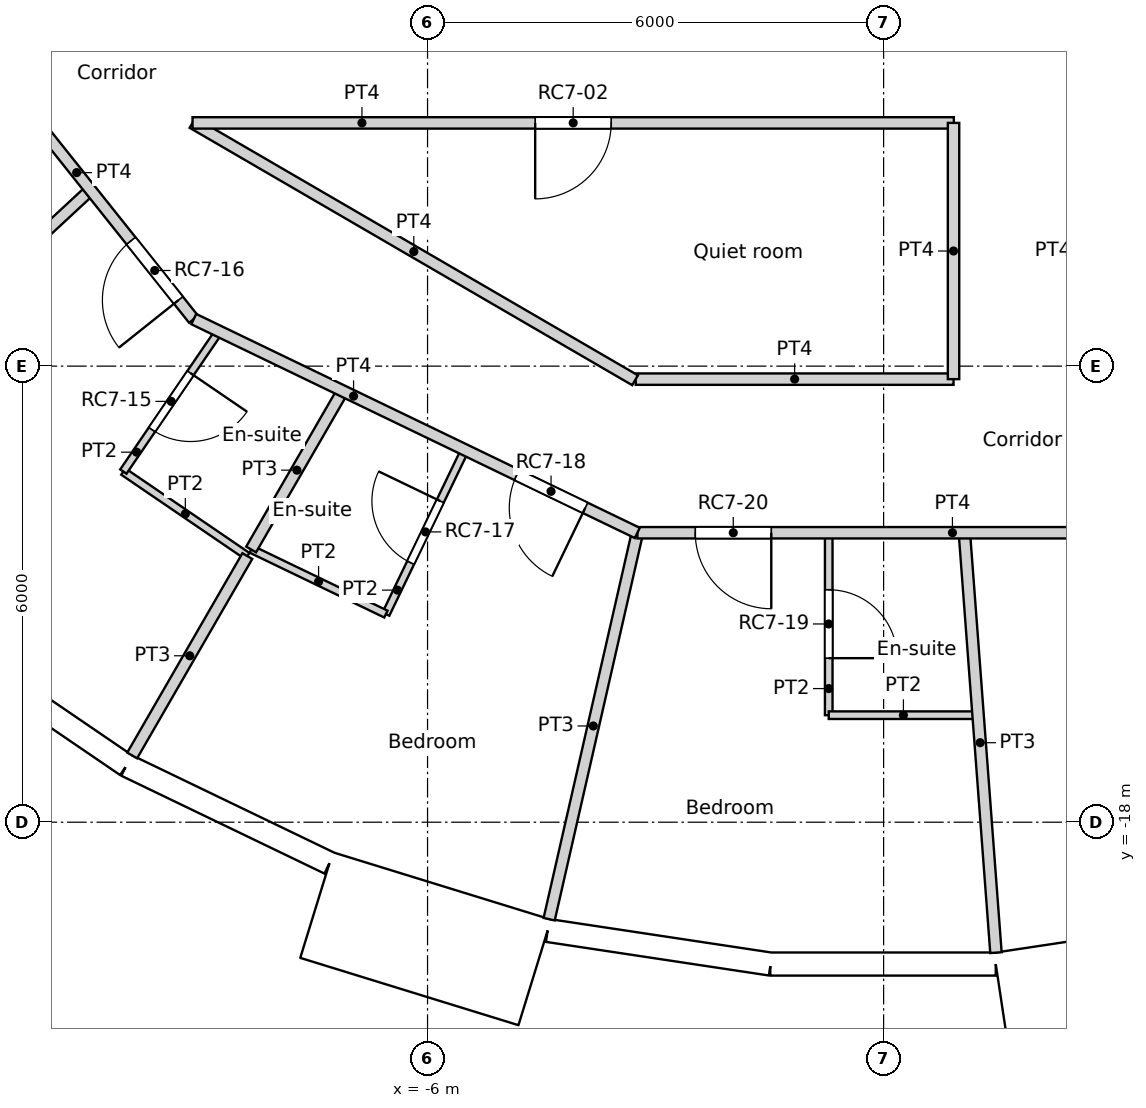
"""IFC4 building model, lengths in metres.
Left out: names, types, materials, properties, quantities, classifications, styles, units other than length and angle.
Written with IfcOpenShell. Run it as: python <this file> out.ifc"""

import sys

from ifc_helpers import new_model, si_unit, direction, frame, frame_2d, origin, origin_2d, place, context, subcontext, project, spatial, rectangle, circle, extrude, element, fill, save


model = new_model("IFC4")
c1 = context("Model", 3, precision=1e-05, world=origin(), true_north=direction((0.0, 1.0)))
c2 = subcontext(c1, "Body", "Model", "MODEL_VIEW")
j1 = project(units=[si_unit("LENGTHUNIT", "METRE"), si_unit("PLANEANGLEUNIT", "RADIAN")], contexts=[c1])
p1 = place(None, origin())
s1 = spatial("IfcSite", under=j1, at=p1, CompositionType="ELEMENT")
p2 = place(p1, origin())
s2 = spatial("IfcBuilding", under=s1, at=p2, CompositionType="ELEMENT")
p3 = place(p2, frame((0.0, 0.0, 294.6)))
s3 = spatial("IfcBuildingStorey", under=s2, at=p3, CompositionType="ELEMENT", Elevation=294.6)
for number, where, z_axis, x_axis in (
    (1, (-9.411, -16.301, 0.0), (0.0, 0.0, 1.0), (1.0, 0.0, 0.0)),
    (2, (-4.188, -18.35, 0.0), (0.0, 0.0, 1.0), (1.0, 0.0, 0.0)),
    (3, (1.406, -18.77, 0.0), (0.0, 0.0, 1.0), (1.0, 0.0, 0.0)),
):
    element("IfcColumn", number, at=place(p3, frame(where, z_axis=z_axis, x_axis=x_axis)), inside=s3, PredefinedType="COLUMN", context=c2, shape_type="SweptSolid", body=[
        extrude(circle(Radius=0.45, at=origin_2d()), origin(), (0.0, 0.0, 1.0), 3.6),
    ])
p4 = place(p3, frame((-12.408, -15.584, 0.0), z_axis=(0.0, 0.0, 1.0), x_axis=(0.826236061068, -0.563324037646, 0.0)))
e4 = element("IfcWall", 4, at=p4, inside=s3, PredefinedType="SOLIDWALL", context=c2, shape_type="SweptSolid", body=[
    extrude(rectangle(XDim=2.962, YDim=0.3, at=frame_2d((1.481, 0.0))), origin(), (0.0, 0.0, 1.0), 3.25),
])
p5 = place(p4, frame((1.481, 0.0, 1.55)))
e5 = element("IfcOpeningElement", 5, at=p5, cuts=e4, PredefinedType="OPENING", context=c2, shape_type="SweptSolid", body=[
    extrude(circle(Radius=0.9, at=origin_2d()), frame((0.0, 0.16, 0.0), z_axis=(0.0, -1.0, 0.0), x_axis=(1.0, 0.0, 0.0)), (0.0, 0.0, 1.0), 0.32),
])
p6 = place(p3, frame((-9.961, -17.253, 0.0), z_axis=(0.0, 0.0, 1.0), x_axis=(0.90095513435, -0.433912255978, 0.0)))
e6 = element("IfcWall", 6, at=p6, inside=s3, PredefinedType="SOLIDWALL", context=c2, shape_type="SweptSolid", body=[
    extrude(rectangle(XDim=2.962, YDim=0.3, at=frame_2d((1.481, 0.0))), origin(), (0.0, 0.0, 1.0), 3.25),
])
p7 = place(p6, frame((1.481, 0.0, 1.55)))
e7 = element("IfcOpeningElement", 7, at=p7, cuts=e6, PredefinedType="OPENING", context=c2, shape_type="SweptSolid", body=[
    extrude(circle(Radius=0.9, at=origin_2d()), frame((0.0, 0.16, 0.0), z_axis=(0.0, -1.0, 0.0), x_axis=(1.0, 0.0, 0.0)), (0.0, 0.0, 1.0), 0.32),
])
p8 = place(p3, frame((-7.458, -19.091, -0.35), z_axis=(0.0, 0.0, 1.0), x_axis=(0.955571139978, -0.294760574774, 0.0)))
e8 = element("IfcWall", 8, at=p8, inside=s3, PredefinedType="ELEMENTEDWALL", context=c2, shape_type="SweptSolid", body=[
    extrude(rectangle(XDim=3.0, YDim=1.45, at=frame_2d((1.5, 0.0))), origin(), (0.0, 0.0, 1.0), 3.6),
])
p9 = place(p8, frame((1.5, 0.0, 1.9)))
e9 = element("IfcOpeningElement", 9, at=p9, cuts=e8, PredefinedType="OPENING", context=c2, shape_type="SweptSolid", body=[
    extrude(circle(Radius=0.9, at=origin_2d()), frame((0.0, 0.735, 0.0), z_axis=(0.0, -1.0, 0.0), x_axis=(1.0, 0.0, 0.0)), (0.0, 0.0, 1.0), 1.47),
])
p10 = place(p3, frame((-4.418, -19.425, 0.0), z_axis=(0.0, 0.0, 1.0), x_axis=(0.988835775663, -0.149009425104, 0.0)))
e10 = element("IfcWall", 10, at=p10, inside=s3, PredefinedType="SOLIDWALL", context=c2, shape_type="SweptSolid", body=[
    extrude(rectangle(XDim=2.962, YDim=0.3, at=frame_2d((1.481, 0.0))), origin(), (0.0, 0.0, 1.0), 3.25),
])
p11 = place(p10, frame((1.481, 0.0, 1.55)))
e11 = element("IfcOpeningElement", 11, at=p11, cuts=e10, PredefinedType="OPENING", context=c2, shape_type="SweptSolid", body=[
    extrude(circle(Radius=0.9, at=origin_2d()), frame((0.0, 0.16, 0.0), z_axis=(0.0, -1.0, 0.0), x_axis=(1.0, 0.0, 0.0)), (0.0, 0.0, 1.0), 0.32),
])
p12 = place(p3, frame((-1.489, -19.866, 0.0), z_axis=(0.0, 0.0, 1.0), x_axis=(1.0, 0.0, 0.0)))
e12 = element("IfcWall", 12, at=p12, inside=s3, PredefinedType="SOLIDWALL", context=c2, shape_type="SweptSolid", body=[
    extrude(rectangle(XDim=2.962, YDim=0.3, at=frame_2d((1.481, 0.0))), origin(), (0.0, 0.0, 1.0), 3.25),
])
p13 = place(p12, frame((1.481, 0.0, 1.55)))
e13 = element("IfcOpeningElement", 13, at=p13, cuts=e12, PredefinedType="OPENING", context=c2, shape_type="SweptSolid", body=[
    extrude(circle(Radius=0.9, at=origin_2d()), frame((0.0, 0.16, 0.0), z_axis=(0.0, -1.0, 0.0), x_axis=(1.0, 0.0, 0.0)), (0.0, 0.0, 1.0), 0.32),
])
p14 = place(p3, frame((1.563, -20.436, -0.35), z_axis=(0.0, 0.0, 1.0), x_axis=(0.988836445254, 0.149004981587, 0.0)))
e14 = element("IfcWall", 14, at=p14, inside=s3, PredefinedType="ELEMENTEDWALL", context=c2, shape_type="SweptSolid", body=[
    extrude(rectangle(XDim=3.0, YDim=1.45, at=frame_2d((1.5, 0.0))), origin(), (0.0, 0.0, 1.0), 3.6),
])
p15 = place(p14, frame((1.5, 0.0, 1.9)))
e15 = element("IfcOpeningElement", 15, at=p15, cuts=e14, PredefinedType="OPENING", context=c2, shape_type="SweptSolid", body=[
    extrude(circle(Radius=0.9, at=origin_2d()), frame((0.0, 0.735, 0.0), z_axis=(0.0, -1.0, 0.0), x_axis=(1.0, 0.0, 0.0)), (0.0, 0.0, 1.0), 1.47),
])
p16 = place(p3, frame((-9.092, -8.8, 0.0), z_axis=(0.0, 0.0, 1.0), x_axis=(1.0, 0.0, 0.0)))
e16 = element("IfcWall", 16, at=p16, inside=s3, PredefinedType="PARTITIONING", context=c2, shape_type="SweptSolid", body=[
    extrude(rectangle(XDim=10.016, YDim=0.15, at=frame_2d((5.008, 0.0))), origin(), (0.0, 0.0, 1.0), 3.25),
])
p17 = place(p16, frame((4.508, 0.0, 0.0)))
e17 = element("IfcOpeningElement", 17, at=p17, cuts=e16, PredefinedType="OPENING", context=c2, shape_type="SweptSolid", body=[
    extrude(rectangle(XDim=1.0, YDim=2.04, at=frame_2d((0.5, 1.02))), frame((0.0, 0.075, 0.0), z_axis=(0.0, -1.0, 0.0), x_axis=(1.0, 0.0, 0.0)), (0.0, 0.0, 1.0), 0.15),
])
p18 = place(p3, frame((-9.092, -8.8, 0.0), z_axis=(0.0, 0.0, 1.0), x_axis=(0.864470922103, -0.502682827277, 0.0)))
e18 = element("IfcWall", 18, at=p18, inside=s3, PredefinedType="PARTITIONING", context=c2, shape_type="SweptSolid", body=[
    extrude(rectangle(XDim=6.735, YDim=0.15, at=frame_2d((3.368, 0.0))), origin(), (0.0, 0.0, 1.0), 3.25),
])
p19 = place(p3, frame((-11.3, -8.596, 0.0), z_axis=(0.0, 0.0, 1.0), x_axis=(0.623390921228, -0.781910326911, 0.0)))
e19 = element("IfcWall", 19, at=p19, inside=s3, PredefinedType="PARTITIONING", context=c2, shape_type="SweptSolid", body=[
    extrude(rectangle(XDim=3.564, YDim=0.15, at=frame_2d((1.782, 0.0))), origin(), (0.0, 0.0, 1.0), 3.25),
])
p20 = place(p19, frame((2.244, 0.0, 0.0)))
e20 = element("IfcOpeningElement", 20, at=p20, cuts=e19, PredefinedType="OPENING", context=c2, shape_type="SweptSolid", body=[
    extrude(rectangle(XDim=1.0, YDim=2.1, at=frame_2d((0.5, 1.05))), frame((0.0, 0.075, 0.0), z_axis=(0.0, -1.0, 0.0), x_axis=(1.0, 0.0, 0.0)), (0.0, 0.0, 1.0), 0.15),
])
p21 = place(p3, frame((-3.261, -12.171, 0.0), z_axis=(0.0, 0.0, 1.0), x_axis=(1.0, 0.0, 0.0)))
e21 = element("IfcWall", 21, at=p21, inside=s3, PredefinedType="PARTITIONING", context=c2, shape_type="SweptSolid", body=[
    extrude(rectangle(XDim=4.181, YDim=0.15, at=frame_2d((2.09, 0.0))), origin(), (0.0, 0.0, 1.0), 3.25),
])
p22 = place(p3, frame((0.92, -12.171, 0.0), z_axis=(0.0, 0.0, 1.0), x_axis=(0.0, 1.0, 0.0)))
e22 = element("IfcWall", 22, at=p22, inside=s3, PredefinedType="PARTITIONING", context=c2, shape_type="SweptSolid", body=[
    extrude(rectangle(XDim=3.371, YDim=0.15, at=frame_2d((1.686, 0.0))), origin(), (0.0, 0.0, 1.0), 3.25),
])
p23 = place(p3, frame((-9.076, -11.381, 0.0), z_axis=(0.0, 0.0, 1.0), x_axis=(0.900778421649, -0.434278983018, 0.0)))
e23 = element("IfcWall", 23, at=p23, inside=s3, PredefinedType="PARTITIONING", context=c2, shape_type="SweptSolid", body=[
    extrude(rectangle(XDim=6.479, YDim=0.15, at=frame_2d((3.239, 0.0))), origin(), (0.0, 0.0, 1.0), 3.25),
])
p24 = place(p23, frame((4.719, 0.0, 0.0)))
e24 = element("IfcOpeningElement", 24, at=p24, cuts=e23, PredefinedType="OPENING", context=c2, shape_type="SweptSolid", body=[
    extrude(rectangle(XDim=1.0, YDim=2.1, at=frame_2d((0.5, 1.05))), frame((0.0, 0.075, 0.0), z_axis=(0.0, -1.0, 0.0), x_axis=(1.0, 0.0, 0.0)), (0.0, 0.0, 1.0), 0.15),
])
p25 = place(p3, frame((-3.239, -14.192, 0.0), z_axis=(0.0, 0.0, 1.0), x_axis=(1.0, 0.0, 0.0)))
e25 = element("IfcWall", 25, at=p25, inside=s3, PredefinedType="PARTITIONING", context=c2, shape_type="SweptSolid", body=[
    extrude(rectangle(XDim=6.478, YDim=0.15, at=frame_2d((3.239, 0.0))), origin(), (0.0, 0.0, 1.0), 3.25),
])
p26 = place(p25, frame((0.761, 0.0, 0.0)))
e26 = element("IfcOpeningElement", 26, at=p26, cuts=e25, PredefinedType="OPENING", context=c2, shape_type="SweptSolid", body=[
    extrude(rectangle(XDim=1.0, YDim=2.1, at=frame_2d((0.5, 1.05))), frame((0.0, 0.075, 0.0), z_axis=(0.0, -1.0, 0.0), x_axis=(1.0, 0.0, 0.0)), (0.0, 0.0, 1.0), 0.15),
])
p27 = place(p3, frame((-14.493, -13.448, 0.0), z_axis=(0.0, 0.0, 1.0), x_axis=(0.73295202722, 0.68028032883, 0.0)))
e27 = element("IfcWall", 27, at=p27, inside=s3, PredefinedType="PARTITIONING", context=c2, shape_type="SweptSolid", body=[
    extrude(rectangle(XDim=5.539, YDim=0.15, at=frame_2d((2.77, 0.0))), origin(), (0.0, 0.0, 1.0), 3.25),
])
p28 = place(p3, frame((-10.002, -13.387, 0.0), z_axis=(0.0, 0.0, 1.0), x_axis=(0.563469042551, 0.826137178734, 0.0)))
e28 = element("IfcWall", 28, at=p28, inside=s3, PredefinedType="PARTITIONING", context=c2, shape_type="SweptSolid", body=[
    extrude(rectangle(XDim=2.234, YDim=0.1, at=frame_2d((1.117, 0.0))), origin(), (0.0, 0.0, 1.0), 3.25),
])
p29 = place(p28, frame((0.667, 0.0, 0.0)))
e29 = element("IfcOpeningElement", 29, at=p29, cuts=e28, PredefinedType="OPENING", context=c2, shape_type="SweptSolid", body=[
    extrude(rectangle(XDim=0.9, YDim=2.04, at=frame_2d((0.45, 1.02))), frame((0.0, 0.05, 0.0), z_axis=(0.0, -1.0, 0.0), x_axis=(1.0, 0.0, 0.0)), (0.0, 0.0, 1.0), 0.1),
])
p30 = place(p3, frame((-10.002, -13.387, 0.0), z_axis=(0.0, 0.0, 1.0), x_axis=(0.82620117489, -0.563375202339, 0.0)))
e30 = element("IfcWall", 30, at=p30, inside=s3, PredefinedType="PARTITIONING", context=c2, shape_type="SweptSolid", body=[
    extrude(rectangle(XDim=1.974, YDim=0.1, at=frame_2d((0.987, 0.0))), origin(), (0.0, 0.0, 1.0), 3.25),
])
p31 = place(p3, frame((-9.886, -17.122, 0.0), z_axis=(0.0, 0.0, 1.0), x_axis=(0.500117793536, 0.865957384972, 0.0)))
e31 = element("IfcWall", 31, at=p31, inside=s3, PredefinedType="PARTITIONING", context=c2, shape_type="SweptSolid", body=[
    extrude(rectangle(XDim=3.029, YDim=0.15, at=frame_2d((1.515, 0.0))), origin(), (0.0, 0.0, 1.0), 3.25),
])
p32 = place(p3, frame((-8.321, -14.412, 0.0), z_axis=(0.0, 0.0, 1.0), x_axis=(0.500017667814, 0.866015203027, 0.0)))
e32 = element("IfcWall", 32, at=p32, inside=s3, PredefinedType="PARTITIONING", context=c2, shape_type="SweptSolid", body=[
    extrude(rectangle(XDim=2.41, YDim=0.15, at=frame_2d((1.205, 0.0))), origin(), (0.0, 0.0, 1.0), 3.25),
])
p33 = place(p3, frame((-8.319, -14.409, 0.0), z_axis=(0.0, 0.0, 1.0), x_axis=(0.900936932599, -0.433950047216, 0.0)))
e33 = element("IfcWall", 33, at=p33, inside=s3, PredefinedType="PARTITIONING", context=c2, shape_type="SweptSolid", body=[
    extrude(rectangle(XDim=1.966, YDim=0.1, at=frame_2d((0.983, 0.0))), origin(), (0.0, 0.0, 1.0), 3.25),
])
p34 = place(p3, frame((-6.548, -15.262, 0.0), z_axis=(0.0, 0.0, 1.0), x_axis=(0.433855388624, 0.900982520231, 0.0)))
e34 = element("IfcWall", 34, at=p34, inside=s3, PredefinedType="PARTITIONING", context=c2, shape_type="SweptSolid", body=[
    extrude(rectangle(XDim=2.399, YDim=0.1, at=frame_2d((1.2, 0.0))), origin(), (0.0, 0.0, 1.0), 3.25),
])
p35 = place(p34, frame((0.75, 0.0, 0.0)))
e35 = element("IfcOpeningElement", 35, at=p35, cuts=e34, PredefinedType="OPENING", context=c2, shape_type="SweptSolid", body=[
    extrude(rectangle(XDim=0.9, YDim=2.04, at=frame_2d((0.45, 1.02))), frame((0.0, 0.05, 0.0), z_axis=(0.0, -1.0, 0.0), x_axis=(1.0, 0.0, 0.0)), (0.0, 0.0, 1.0), 0.1),
])
p36 = place(p3, frame((-4.4, -19.276, 0.0), z_axis=(0.0, 0.0, 1.0), x_axis=(0.222612505682, 0.974907007008, 0.0)))
e36 = element("IfcWall", 36, at=p36, inside=s3, PredefinedType="PARTITIONING", context=c2, shape_type="SweptSolid", body=[
    extrude(rectangle(XDim=5.215, YDim=0.15, at=frame_2d((2.607, 0.0))), origin(), (0.0, 0.0, 1.0), 3.25),
])
p37 = place(p3, frame((-0.722, -16.592, 0.0), z_axis=(0.0, 0.0, 1.0), x_axis=(0.0, 1.0, 0.0)))
e37 = element("IfcWall", 37, at=p37, inside=s3, PredefinedType="PARTITIONING", context=c2, shape_type="SweptSolid", body=[
    extrude(rectangle(XDim=2.4, YDim=0.1, at=frame_2d((1.2, 0.0))), origin(), (0.0, 0.0, 1.0), 3.25),
])
p38 = place(p37, frame((0.75, 0.0, 0.0)))
e38 = element("IfcOpeningElement", 38, at=p38, cuts=e37, PredefinedType="OPENING", context=c2, shape_type="SweptSolid", body=[
    extrude(rectangle(XDim=0.9, YDim=2.04, at=frame_2d((0.45, 1.02))), frame((0.0, 0.05, 0.0), z_axis=(0.0, -1.0, 0.0), x_axis=(1.0, 0.0, 0.0)), (0.0, 0.0, 1.0), 0.1),
])
p39 = place(p3, frame((-0.722, -16.592, 0.0), z_axis=(0.0, 0.0, 1.0), x_axis=(1.0, 0.0, 0.0)))
e39 = element("IfcWall", 39, at=p39, inside=s3, PredefinedType="PARTITIONING", context=c2, shape_type="SweptSolid", body=[
    extrude(rectangle(XDim=1.965, YDim=0.1, at=frame_2d((0.982, 0.0))), origin(), (0.0, 0.0, 1.0), 3.25),
])
p40 = place(p3, frame((1.062, -14.192, 0.0), z_axis=(0.0, 0.0, 1.0), x_axis=(0.075011267216, -0.997182686267, 0.0)))
e40 = element("IfcWall", 40, at=p40, inside=s3, PredefinedType="PARTITIONING", context=c2, shape_type="SweptSolid", body=[
    extrude(rectangle(XDim=5.54, YDim=0.15, at=frame_2d((2.77, 0.0))), origin(), (0.0, 0.0, 1.0), 3.25),
])
p41 = place(p5, origin())
e41 = element("IfcWindow", 41, at=p41, inside=s3, PartitioningType="SINGLE_PANEL", PredefinedType="WINDOW", context=c2, shape_type="SweptSolid", body=[
    extrude(circle(Radius=0.9, at=origin_2d()), frame((0.0, 0.12, 0.0), z_axis=(0.0, -1.0, 0.0), x_axis=(1.0, 0.0, 0.0)), (0.0, 0.0, 1.0), 0.1),
])
fill(e5, e41)
p42 = place(p7, origin())
e42 = element("IfcWindow", 42, at=p42, inside=s3, PartitioningType="SINGLE_PANEL", PredefinedType="WINDOW", context=c2, shape_type="SweptSolid", body=[
    extrude(circle(Radius=0.9, at=origin_2d()), frame((0.0, 0.12, 0.0), z_axis=(0.0, -1.0, 0.0), x_axis=(1.0, 0.0, 0.0)), (0.0, 0.0, 1.0), 0.1),
])
fill(e7, e42)
p43 = place(p9, origin())
e43 = element("IfcWindow", 43, at=p43, inside=s3, PartitioningType="SINGLE_PANEL", PredefinedType="WINDOW", context=c2, shape_type="SweptSolid", body=[
    extrude(circle(Radius=0.9, at=origin_2d()), frame((0.0, 0.695, 0.0), z_axis=(0.0, -1.0, 0.0), x_axis=(1.0, 0.0, 0.0)), (0.0, 0.0, 1.0), 0.1),
])
fill(e9, e43)
p44 = place(p11, origin())
e44 = element("IfcWindow", 44, at=p44, inside=s3, PartitioningType="SINGLE_PANEL", PredefinedType="WINDOW", context=c2, shape_type="SweptSolid", body=[
    extrude(circle(Radius=0.9, at=origin_2d()), frame((0.0, 0.12, 0.0), z_axis=(0.0, -1.0, 0.0), x_axis=(1.0, 0.0, 0.0)), (0.0, 0.0, 1.0), 0.1),
])
fill(e11, e44)
p45 = place(p13, origin())
e45 = element("IfcWindow", 45, at=p45, inside=s3, PartitioningType="SINGLE_PANEL", PredefinedType="WINDOW", context=c2, shape_type="SweptSolid", body=[
    extrude(circle(Radius=0.9, at=origin_2d()), frame((0.0, 0.12, 0.0), z_axis=(0.0, -1.0, 0.0), x_axis=(1.0, 0.0, 0.0)), (0.0, 0.0, 1.0), 0.1),
])
fill(e13, e45)
p46 = place(p15, origin())
e46 = element("IfcWindow", 46, at=p46, inside=s3, PartitioningType="SINGLE_PANEL", PredefinedType="WINDOW", context=c2, shape_type="SweptSolid", body=[
    extrude(circle(Radius=0.9, at=origin_2d()), frame((0.0, 0.695, 0.0), z_axis=(0.0, -1.0, 0.0), x_axis=(1.0, 0.0, 0.0)), (0.0, 0.0, 1.0), 0.1),
])
fill(e15, e46)
p47 = place(p17, origin())
e47 = element("IfcDoor", 47, at=p47, inside=s3, OperationType="SINGLE_SWING_RIGHT", PredefinedType="DOOR", context=c2, shape_type="SweptSolid", body=[
    extrude(rectangle(XDim=1.0, YDim=2.04, at=frame_2d((0.5, 1.02))), frame((0.0, 0.025, 0.0), z_axis=(0.0, -1.0, 0.0), x_axis=(1.0, 0.0, 0.0)), (0.0, 0.0, 1.0), 0.05),
])
fill(e17, e47)
p48 = place(p29, origin())
e48 = element("IfcDoor", 48, at=p48, inside=s3, OperationType="SINGLE_SWING_LEFT", PredefinedType="DOOR", context=c2, shape_type="SweptSolid", body=[
    extrude(rectangle(XDim=0.9, YDim=2.04, at=frame_2d((0.45, 1.02))), frame((0.0, 0.025, 0.0), z_axis=(0.0, -1.0, 0.0), x_axis=(1.0, 0.0, 0.0)), (0.0, 0.0, 1.0), 0.05),
])
fill(e29, e48)
p49 = place(p20, origin())
e49 = element("IfcDoor", 49, at=p49, inside=s3, OperationType="SINGLE_SWING_LEFT", PredefinedType="DOOR", context=c2, shape_type="SweptSolid", body=[
    extrude(rectangle(XDim=1.0, YDim=2.1, at=frame_2d((0.5, 1.05))), frame((0.0, 0.025, 0.0), z_axis=(0.0, -1.0, 0.0), x_axis=(1.0, 0.0, 0.0)), (0.0, 0.0, 1.0), 0.05),
])
fill(e20, e49)
p50 = place(p35, origin())
e50 = element("IfcDoor", 50, at=p50, inside=s3, OperationType="SINGLE_SWING_RIGHT", PredefinedType="DOOR", context=c2, shape_type="SweptSolid", body=[
    extrude(rectangle(XDim=0.9, YDim=2.04, at=frame_2d((0.45, 1.02))), frame((0.0, 0.025, 0.0), z_axis=(0.0, -1.0, 0.0), x_axis=(1.0, 0.0, 0.0)), (0.0, 0.0, 1.0), 0.05),
])
fill(e35, e50)
p51 = place(p24, origin())
e51 = element("IfcDoor", 51, at=p51, inside=s3, OperationType="SINGLE_SWING_LEFT", PredefinedType="DOOR", context=c2, shape_type="SweptSolid", body=[
    extrude(rectangle(XDim=1.0, YDim=2.1, at=frame_2d((0.5, 1.05))), frame((0.0, 0.025, 0.0), z_axis=(0.0, -1.0, 0.0), x_axis=(1.0, 0.0, 0.0)), (0.0, 0.0, 1.0), 0.05),
])
fill(e24, e51)
p52 = place(p38, origin())
e52 = element("IfcDoor", 52, at=p52, inside=s3, OperationType="SINGLE_SWING_RIGHT", PredefinedType="DOOR", context=c2, shape_type="SweptSolid", body=[
    extrude(rectangle(XDim=0.9, YDim=2.04, at=frame_2d((0.45, 1.02))), frame((0.0, 0.025, 0.0), z_axis=(0.0, -1.0, 0.0), x_axis=(1.0, 0.0, 0.0)), (0.0, 0.0, 1.0), 0.05),
])
fill(e38, e52)
p53 = place(p26, origin())
e53 = element("IfcDoor", 53, at=p53, inside=s3, OperationType="SINGLE_SWING_LEFT", PredefinedType="DOOR", context=c2, shape_type="SweptSolid", body=[
    extrude(rectangle(XDim=1.0, YDim=2.1, at=frame_2d((0.5, 1.05))), frame((0.0, 0.025, 0.0), z_axis=(0.0, -1.0, 0.0), x_axis=(1.0, 0.0, 0.0)), (0.0, 0.0, 1.0), 0.05),
])
fill(e26, e53)
save(model, sys.argv[1])
